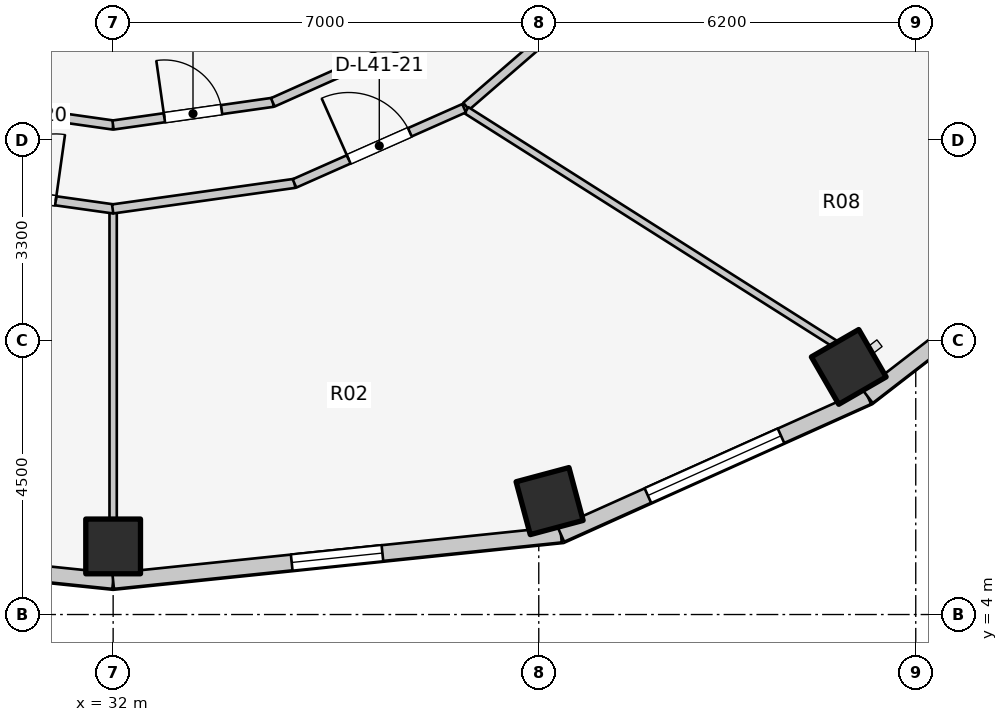
"""IFC4 building model, lengths in metres.
Left out: names, types, materials, properties, quantities, classifications, styles, units other than length and angle.
Written with IfcOpenShell. Run it as: python <this file> out.ifc"""

import sys

from ifc_helpers import new_model, si_unit, direction, frame, frame_2d, origin, origin_2d, place, context, subcontext, project, spatial, rectangle, extrude, element, fill, save


model = new_model("IFC4")
c1 = context("Model", 3, precision=1e-05, world=origin(), true_north=direction((0.0, 1.0)))
c2 = subcontext(c1, "Body", "Model", "MODEL_VIEW")
j1 = project(units=[si_unit("LENGTHUNIT", "METRE"), si_unit("PLANEANGLEUNIT", "RADIAN")], contexts=[c1])
p1 = place(None, origin())
s1 = spatial("IfcSite", under=j1, at=p1, CompositionType="ELEMENT")
p2 = place(p1, origin())
s2 = spatial("IfcBuilding", under=s1, at=p2, CompositionType="ELEMENT")
p3 = place(p2, frame((0.0, 0.0, 137.4)))
s3 = spatial("IfcBuildingStorey", under=s2, at=p3, CompositionType="ELEMENT", Elevation=137.4)
for number, where, z_axis, x_axis in (
    (1, (32.0, 5.12, 0.0), (0.0, 0.0, 1.0), (0.0, -1.0, 0.0)),
    (2, (39.178, 5.865, 0.0), (0.0, 0.0, 1.0), (0.259, -0.966, 0.0)),
    (3, (44.098, 8.072, 0.0), (0.0, 0.0, 1.0), (0.5, -0.866, 0.0)),
):
    element("IfcColumn", number, at=place(p3, frame(where, z_axis=z_axis, x_axis=x_axis)), inside=s3, PredefinedType="COLUMN", context=c2, shape_type="SweptSolid", body=[
        extrude(rectangle(XDim=0.9, YDim=0.9, at=origin_2d()), origin(), (0.0, 0.0, 1.0), 3.1),
    ])
p4 = place(p3, frame((24.635, 5.315, 0.0), z_axis=(0.0, 0.0, 1.0), x_axis=(0.994664178965, -0.10316574569, 0.0)))
e4 = element("IfcWall", 4, at=p4, inside=s3, PredefinedType="STANDARD", context=c2, shape_type="SweptSolid", body=[
    extrude(rectangle(XDim=7.405, YDim=0.26, at=frame_2d((3.702, 0.0))), origin(), (0.0, 0.0, 1.0), 2.85),
])
p5 = place(p4, frame((2.952, 0.0, 0.75)))
e5 = element("IfcOpeningElement", 5, at=p5, cuts=e4, PredefinedType="OPENING", context=c2, shape_type="SweptSolid", body=[
    extrude(rectangle(XDim=1.5, YDim=1.6, at=frame_2d((0.75, 0.8))), frame((0.0, 0.14, 0.0), z_axis=(0.0, -1.0, 0.0), x_axis=(1.0, 0.0, 0.0)), (0.0, 0.0, 1.0), 0.28),
])
p6 = place(p3, frame((32.0, 4.552, 0.0), z_axis=(0.0, 0.0, 1.0), x_axis=(0.994664178965, 0.10316574569, 0.0)))
e6 = element("IfcWall", 6, at=p6, inside=s3, PredefinedType="STANDARD", context=c2, shape_type="SweptSolid", body=[
    extrude(rectangle(XDim=7.405, YDim=0.26, at=frame_2d((3.702, 0.0))), origin(), (0.0, 0.0, 1.0), 2.85),
])
p7 = place(p6, frame((2.952, 0.0, 0.75)))
e7 = element("IfcOpeningElement", 7, at=p7, cuts=e6, PredefinedType="OPENING", context=c2, shape_type="SweptSolid", body=[
    extrude(rectangle(XDim=1.5, YDim=1.6, at=frame_2d((0.75, 0.8))), frame((0.0, 0.14, 0.0), z_axis=(0.0, -1.0, 0.0), x_axis=(1.0, 0.0, 0.0)), (0.0, 0.0, 1.0), 0.28),
])
p8 = place(p3, frame((39.365, 5.315, 0.0), z_axis=(0.0, 0.0, 1.0), x_axis=(0.912353637112, 0.409403029847, 0.0)))
e8 = element("IfcWall", 8, at=p8, inside=s3, PredefinedType="STANDARD", context=c2, shape_type="SweptSolid", body=[
    extrude(rectangle(XDim=5.533, YDim=0.26, at=frame_2d((2.766, 0.0))), origin(), (0.0, 0.0, 1.0), 2.85),
])
p9 = place(p8, frame((1.566, 0.0, 0.75)))
e9 = element("IfcOpeningElement", 9, at=p9, cuts=e8, PredefinedType="OPENING", context=c2, shape_type="SweptSolid", body=[
    extrude(rectangle(XDim=2.4, YDim=1.7, at=frame_2d((1.2, 0.85))), frame((0.0, 0.14, 0.0), z_axis=(0.0, -1.0, 0.0), x_axis=(1.0, 0.0, 0.0)), (0.0, 0.0, 1.0), 0.28),
])
p10 = place(p3, frame((44.413, 7.581, 0.0), z_axis=(0.0, 0.0, 1.0), x_axis=(0.791460185804, 0.611220724687, 0.0)))
e10 = element("IfcWall", 10, at=p10, inside=s3, PredefinedType="STANDARD", context=c2, shape_type="SweptSolid", body=[
    extrude(rectangle(XDim=4.872, YDim=0.26, at=frame_2d((2.436, 0.0))), origin(), (0.0, 0.0, 1.0), 2.85),
])
p11 = place(p3, frame((37.807, 12.358, 0.0), z_axis=(0.0, 0.0, 1.0), x_axis=(0.756055312247, 0.654507727092, 0.0)))
e11 = element("IfcWall", 11, at=p11, inside=s3, PredefinedType="PARTITIONING", context=c2, shape_type="SweptSolid", body=[
    extrude(rectangle(XDim=2.111, YDim=0.15, at=frame_2d((1.055, 0.0))), origin(), (0.0, 0.0, 1.0), 2.299),
])
p12 = place(p3, frame((29.371, 12.424, 0.0), z_axis=(0.0, 0.0, 1.0), x_axis=(0.990066775667, -0.1405979364, 0.0)))
e12 = element("IfcWall", 12, at=p12, inside=s3, PredefinedType="PARTITIONING", context=c2, shape_type="SweptSolid", body=[
    extrude(rectangle(XDim=2.657, YDim=0.15, at=frame_2d((1.328, 0.0))), origin(), (0.0, 0.0, 1.0), 2.299),
])
p13 = place(p3, frame((31.998, 12.05, 0.0), z_axis=(0.0, 0.0, 1.0), x_axis=(0.990066775667, 0.1405979364, 0.0)))
e13 = element("IfcWall", 13, at=p13, inside=s3, PredefinedType="PARTITIONING", context=c2, shape_type="SweptSolid", body=[
    extrude(rectangle(XDim=2.657, YDim=0.15, at=frame_2d((1.328, 0.0))), origin(), (0.0, 0.0, 1.0), 2.299),
])
p14 = place(p13, frame((0.854, 0.0, 0.0)))
e14 = element("IfcOpeningElement", 14, at=p14, cuts=e13, PredefinedType="OPENING", context=c2, shape_type="SweptSolid", body=[
    extrude(rectangle(XDim=0.95, YDim=2.1, at=frame_2d((0.475, 1.05))), frame((0.0, 0.085, 0.0), z_axis=(0.0, -1.0, 0.0), x_axis=(1.0, 0.0, 0.0)), (0.0, 0.0, 1.0), 0.17),
])
p15 = place(p3, frame((34.625, 12.423, 0.0), z_axis=(0.0, 0.0, 1.0), x_axis=(0.912888568324, 0.408208845842, 0.0)))
e15 = element("IfcWall", 15, at=p15, inside=s3, PredefinedType="PARTITIONING", context=c2, shape_type="SweptSolid", body=[
    extrude(rectangle(XDim=2.69, YDim=0.15, at=frame_2d((1.345, 0.0))), origin(), (0.0, 0.0, 1.0), 2.299),
])
p16 = place(p3, frame((32.0, 10.615, 0.0), z_axis=(0.0, 0.0, 1.0), x_axis=(0.0, -1.0, 0.0)))
e16 = element("IfcWall", 16, at=p16, inside=s3, PredefinedType="MOVABLE", context=c2, shape_type="SweptSolid", body=[
    extrude(rectangle(XDim=5.065, YDim=0.12, at=frame_2d((2.532, 0.0))), origin(), (0.0, 0.0, 1.0), 2.299),
])
p17 = place(p3, frame((37.812, 12.292, 0.0), z_axis=(0.0, 0.0, 1.0), x_axis=(0.844640430122, -0.535334048799, 0.0)))
e17 = element("IfcWall", 17, at=p17, inside=s3, PredefinedType="MOVABLE", context=c2, shape_type="SweptSolid", body=[
    extrude(rectangle(XDim=7.188, YDim=0.12, at=frame_2d((3.594, 0.0))), origin(), (0.0, 0.0, 1.0), 2.299),
])
p18 = place(p3, frame((29.014, 11.091, 0.0), z_axis=(0.0, 0.0, 1.0), x_axis=(0.990263536759, -0.139205343882, 0.0)))
e18 = element("IfcWall", 18, at=p18, inside=s3, PredefinedType="PARTITIONING", context=c2, shape_type="SweptSolid", body=[
    extrude(rectangle(XDim=3.024, YDim=0.15, at=frame_2d((1.512, 0.0))), origin(), (0.0, 0.0, 1.0), 2.299),
])
p19 = place(p18, frame((0.962, 0.0, 0.0)))
e19 = element("IfcOpeningElement", 19, at=p19, cuts=e18, PredefinedType="OPENING", context=c2, shape_type="SweptSolid", body=[
    extrude(rectangle(XDim=1.1, YDim=2.1, at=frame_2d((0.55, 1.05))), frame((0.0, 0.085, 0.0), z_axis=(0.0, -1.0, 0.0), x_axis=(1.0, 0.0, 0.0)), (0.0, 0.0, 1.0), 0.17),
])
p20 = place(p3, frame((31.992, 10.67, 0.0), z_axis=(0.0, 0.0, 1.0), x_axis=(0.990263536759, 0.139205343882, 0.0)))
e20 = element("IfcWall", 20, at=p20, inside=s3, PredefinedType="PARTITIONING", context=c2, shape_type="SweptSolid", body=[
    extrude(rectangle(XDim=3.024, YDim=0.15, at=frame_2d((1.512, 0.0))), origin(), (0.0, 0.0, 1.0), 2.299),
])
p21 = place(p3, frame((34.982, 11.09, 0.0), z_axis=(0.0, 0.0, 1.0), x_axis=(0.914216890927, 0.405225216815, 0.0)))
e21 = element("IfcWall", 21, at=p21, inside=s3, PredefinedType="PARTITIONING", context=c2, shape_type="SweptSolid", body=[
    extrude(rectangle(XDim=3.052, YDim=0.15, at=frame_2d((1.526, 0.0))), origin(), (0.0, 0.0, 1.0), 2.299),
])
p22 = place(p21, frame((0.976, 0.0, 0.0)))
e22 = element("IfcOpeningElement", 22, at=p22, cuts=e21, PredefinedType="OPENING", context=c2, shape_type="SweptSolid", body=[
    extrude(rectangle(XDim=1.1, YDim=2.1, at=frame_2d((0.55, 1.05))), frame((0.0, 0.085, 0.0), z_axis=(0.0, -1.0, 0.0), x_axis=(1.0, 0.0, 0.0)), (0.0, 0.0, 1.0), 0.17),
])
p23 = place(p7, origin())
e23 = element("IfcWindow", 23, at=p23, inside=s3, PartitioningType="SINGLE_PANEL", PredefinedType="WINDOW", context=c2, shape_type="SweptSolid", body=[
    extrude(rectangle(XDim=1.5, YDim=1.6, at=frame_2d((0.75, 0.8))), frame((0.0, 0.03, 0.0), z_axis=(0.0, -1.0, 0.0), x_axis=(1.0, 0.0, 0.0)), (0.0, 0.0, 1.0), 0.06),
])
fill(e7, e23)
p24 = place(p9, origin())
e24 = element("IfcWindow", 24, at=p24, inside=s3, PartitioningType="SINGLE_PANEL", PredefinedType="WINDOW", context=c2, shape_type="SweptSolid", body=[
    extrude(rectangle(XDim=2.4, YDim=1.7, at=frame_2d((1.2, 0.85))), frame((0.0, 0.03, 0.0), z_axis=(0.0, -1.0, 0.0), x_axis=(1.0, 0.0, 0.0)), (0.0, 0.0, 1.0), 0.06),
])
fill(e9, e24)
p25 = place(p14, origin())
e25 = element("IfcDoor", 25, at=p25, inside=s3, OperationType="SINGLE_SWING_LEFT", PredefinedType="DOOR", context=c2, shape_type="SweptSolid", body=[
    extrude(rectangle(XDim=0.95, YDim=2.1, at=frame_2d((0.475, 1.05))), frame((0.0, 0.025, 0.0), z_axis=(0.0, -1.0, 0.0), x_axis=(1.0, 0.0, 0.0)), (0.0, 0.0, 1.0), 0.05),
])
fill(e14, e25)
p26 = place(p19, origin())
e26 = element("IfcDoor", 26, at=p26, inside=s3, OperationType="SINGLE_SWING_RIGHT", PredefinedType="DOOR", context=c2, shape_type="SweptSolid", body=[
    extrude(rectangle(XDim=1.1, YDim=2.1, at=frame_2d((0.55, 1.05))), frame((0.0, 0.025, 0.0), z_axis=(0.0, -1.0, 0.0), x_axis=(1.0, 0.0, 0.0)), (0.0, 0.0, 1.0), 0.05),
])
fill(e19, e26)
p27 = place(p22, origin())
e27 = element("IfcDoor", 27, at=p27, inside=s3, OperationType="SINGLE_SWING_LEFT", PredefinedType="DOOR", context=c2, shape_type="SweptSolid", body=[
    extrude(rectangle(XDim=1.1, YDim=2.1, at=frame_2d((0.55, 1.05))), frame((0.0, 0.025, 0.0), z_axis=(0.0, -1.0, 0.0), x_axis=(1.0, 0.0, 0.0)), (0.0, 0.0, 1.0), 0.05),
])
fill(e22, e27)
save(model, sys.argv[1])
